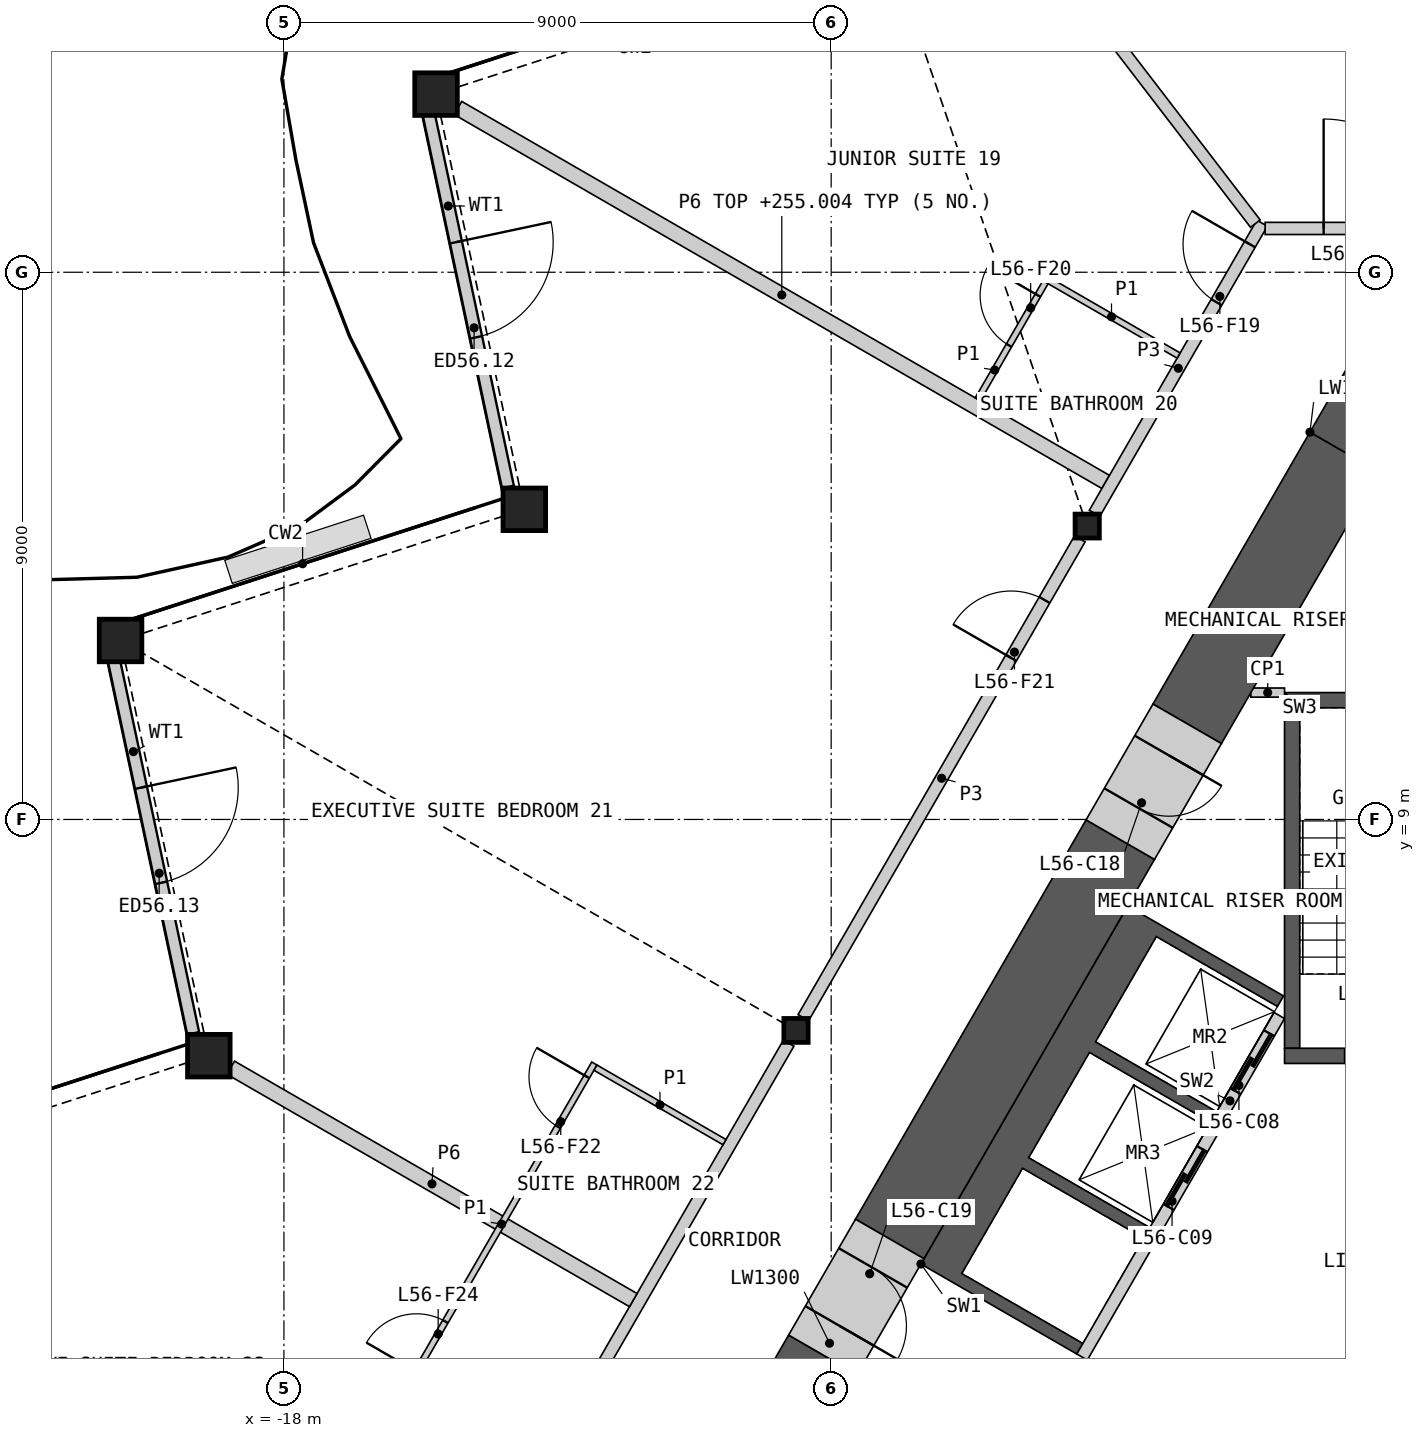
"""IFC4 building model, lengths in metres.
Left out: names, types, materials, properties, quantities, classifications, styles, units other than length and angle.
Written with IfcOpenShell. Run it as: python <this file> out.ifc"""

import sys

from ifc_helpers import new_model, si_unit, direction, frame, frame_2d, origin, origin_2d, place, context, subcontext, project, spatial, polyline, rectangle, hollow_rectangle, i_section, outline, extrude, element, fill, save


model = new_model("IFC4")
c1 = context("Model", 3, precision=1e-05, world=origin(), true_north=direction((0.0, 1.0)))
c2 = subcontext(c1, "Body", "Model", "MODEL_VIEW")
j1 = project(units=[si_unit("LENGTHUNIT", "METRE"), si_unit("PLANEANGLEUNIT", "RADIAN")], contexts=[c1])
p1 = place(None, origin())
s1 = spatial("IfcSite", under=j1, at=p1, CompositionType="ELEMENT")
p2 = place(p1, origin())
s2 = spatial("IfcBuilding", under=s1, at=p2, CompositionType="ELEMENT")
p3 = place(p2, frame((0.0, 0.0, 252.6)))
s3 = spatial("IfcBuildingStorey", under=s2, at=p3, CompositionType="ELEMENT", Elevation=252.6)
for number, where, z_axis, x_axis in (
    (1, (-15.499, 20.93, 0.0), (0.0, 0.0, 1.0), (1.0, 0.0, 0.0)),
    (2, (-14.047, 14.101, 0.0), (0.0, 0.0, 1.0), (1.0, 0.0, 0.0)),
    (3, (-20.687, 11.943, 0.0), (0.0, 0.0, 1.0), (1.0, 0.0, 0.0)),
    (4, (-19.235, 5.115, 0.0), (0.0, 0.0, 1.0), (1.0, 0.0, 0.0)),
):
    element("IfcColumn", number, at=place(p3, frame(where, z_axis=z_axis, x_axis=x_axis)), inside=s3, PredefinedType="COLUMN", context=c2, shape_type="SweptSolid", body=[
        extrude(hollow_rectangle(XDim=0.7, YDim=0.7, WallThickness=0.045, at=origin_2d()), origin(), (0.0, 0.0, 1.0), 3.6),
    ])
for number, where, z_axis, x_axis in (
    (5, (-4.789, 13.825, 0.0), (0.0, 0.0, 1.0), (1.0, 0.0, 0.0)),
    (6, (-9.578, 5.53, 0.0), (0.0, 0.0, 1.0), (1.0, 0.0, 0.0)),
):
    element("IfcColumn", number, at=place(p3, frame(where, z_axis=z_axis, x_axis=x_axis)), inside=s3, PredefinedType="COLUMN", context=c2, shape_type="SweptSolid", body=[
        extrude(i_section(OverallWidth=0.399, OverallDepth=0.393, WebThickness=0.023, FlangeThickness=0.037, at=origin_2d()), origin(), (0.0, 0.0, 1.0), 3.6),
    ])
p4 = place(p3, frame((-15.626, 20.631, 0.0), z_axis=(0.0, 0.0, 1.0), x_axis=(0.207882853761, -0.978153729795, 0.0)))
e7 = element("IfcWall", 7, at=p4, inside=s3, PredefinedType="SOLIDWALL", context=c2, shape_type="SweptSolid", body=[
    extrude(rectangle(XDim=6.301, YDim=0.2, at=frame_2d((3.15, 0.0))), origin(), (0.0, 0.0, 1.0), 2.701),
])
p5 = place(p4, frame((2.184, 0.0, 0.0)))
e8 = element("IfcOpeningElement", 8, at=p5, cuts=e7, PredefinedType="OPENING", context=c2, shape_type="SweptSolid", body=[
    extrude(rectangle(XDim=1.6, YDim=2.4, at=frame_2d((0.8, 1.2))), frame((0.0, 0.11, 0.0), z_axis=(0.0, -1.0, 0.0), x_axis=(1.0, 0.0, 0.0)), (0.0, 0.0, 1.0), 0.22),
])
p6 = place(p3, frame((-20.805, 11.659, 0.0), z_axis=(0.0, 0.0, 1.0), x_axis=(0.207913305093, -0.978147257608, 0.0)))
e9 = element("IfcWall", 9, at=p6, inside=s3, PredefinedType="SOLIDWALL", context=c2, shape_type="SweptSolid", body=[
    extrude(rectangle(XDim=6.316, YDim=0.2, at=frame_2d((3.158, 0.0))), origin(), (0.0, 0.0, 1.0), 2.701),
])
p7 = place(p6, frame((2.184, 0.0, 0.0)))
e10 = element("IfcOpeningElement", 10, at=p7, cuts=e9, PredefinedType="OPENING", context=c2, shape_type="SweptSolid", body=[
    extrude(rectangle(XDim=1.6, YDim=2.4, at=frame_2d((0.8, 1.2))), frame((0.0, 0.11, 0.0), z_axis=(0.0, -1.0, 0.0), x_axis=(1.0, 0.0, 0.0)), (0.0, 0.0, 1.0), 0.22),
])
p8 = place(p3, origin())
e11 = element("IfcWall", 11, at=p8, inside=s3, PredefinedType="SHEAR", context=c2, shape_type="SweptSolid", body=[
    extrude(outline(polyline([(-7.524, 1.688), (-4.124, 7.577), (-3.731, 7.35), (-1.561, 6.097), (-1.66, 5.924), (-3.652, 7.074), (-4.652, 5.342), (-2.66, 4.192), (-2.76, 4.019), (-4.752, 5.169), (-5.752, 3.437), (-3.76, 2.287), (-3.861, 2.113), (-5.852, 3.263), (-6.852, 1.531), (-4.861, 0.381), (-4.96, 0.208), (-7.131, 1.461), (-7.524, 1.688)])), origin(), (0.0, 0.0, 1.0), 3.25),
])
p9 = place(p3, frame((-1.631, 5.776, 0.0), z_axis=(0.0, 0.0, 1.0), x_axis=(-0.499992876559, -0.866029516466, 0.0)))
e12 = element("IfcWall", 12, at=p9, inside=s3, PredefinedType="SOLIDWALL", context=c2, shape_type="SweptSolid", body=[
    extrude(rectangle(XDim=6.486, YDim=0.2, at=frame_2d((3.243, 0.0))), origin(), (0.0, 0.0, 1.0), 3.25),
])
p10 = place(p9, frame((0.337, 0.0, 0.0)))
e13 = element("IfcOpeningElement", 13, at=p10, cuts=e12, PredefinedType="OPENING", context=c2, shape_type="SweptSolid", body=[
    extrude(rectangle(XDim=1.1, YDim=2.1, at=frame_2d((0.55, 1.05))), frame((0.0, 0.11, 0.0), z_axis=(0.0, -1.0, 0.0), x_axis=(1.0, 0.0, 0.0)), (0.0, 0.0, 1.0), 0.22),
])
p11 = place(p9, frame((2.537, 0.0, 0.0)))
e14 = element("IfcOpeningElement", 14, at=p11, cuts=e12, PredefinedType="OPENING", context=c2, shape_type="SweptSolid", body=[
    extrude(rectangle(XDim=1.1, YDim=2.1, at=frame_2d((0.55, 1.05))), frame((0.0, 0.11, 0.0), z_axis=(0.0, -1.0, 0.0), x_axis=(1.0, 0.0, 0.0)), (0.0, 0.0, 1.0), 0.22),
])
p12 = place(p3, origin())
e15 = element("IfcWall", 15, at=p12, inside=s3, PredefinedType="SHEAR", context=c2, shape_type="SweptSolid", body=[
    extrude(outline(polyline([(1.544, 11.087), (-1.544, 11.087), (-1.294, 10.837), (1.294, 10.837), (1.544, 11.087)])), origin(), (0.0, 0.0, 1.0), 3.25),
])
p13 = place(p3, origin())
e16 = element("IfcWall", 16, at=p13, inside=s3, PredefinedType="SHEAR", context=c2, shape_type="SweptSolid", body=[
    extrude(outline(polyline([(-1.294, 10.837), (-1.544, 11.087), (-1.544, 5.237), (-1.294, 5.237), (-1.294, 10.837)])), origin(), (0.0, 0.0, 1.0), 3.25),
])
p14 = place(p3, frame((1.544, 5.112, 0.0), z_axis=(0.0, 0.0, 1.0), x_axis=(-1.0, 0.0, 0.0)))
e17 = element("IfcWall", 17, at=p14, inside=s3, PredefinedType="SHEAR", context=c2, shape_type="SweptSolid", body=[
    extrude(rectangle(XDim=3.088, YDim=0.25, at=frame_2d((1.544, 0.0))), origin(), (0.0, 0.0, 1.0), 3.25),
])
p15 = place(p14, frame((0.994, 0.0, 0.0)))
e18 = element("IfcOpeningElement", 18, at=p15, cuts=e17, PredefinedType="OPENING", context=c2, shape_type="SweptSolid", body=[
    extrude(rectangle(XDim=1.1, YDim=2.1, at=frame_2d((0.55, 1.05))), frame((0.0, 0.135, 0.0), z_axis=(0.0, -1.0, 0.0), x_axis=(1.0, 0.0, 0.0)), (0.0, 0.0, 1.0), 0.27),
])
p16 = place(p3, frame((-1.544, 11.087, 0.0), z_axis=(0.0, 0.0, 1.0), x_axis=(-1.0, 0.0, 0.0)))
e19 = element("IfcWall", 19, at=p16, inside=s3, PredefinedType="PARTITIONING", context=c2, shape_type="SweptSolid", body=[
    extrude(rectangle(XDim=0.554, YDim=0.15, at=frame_2d((0.277, 0.0))), origin(), (0.0, 0.0, 1.0), 3.25),
])
p17 = place(p3, frame((-4.245, 8.668, 0.0), z_axis=(0.0, 0.0, 1.0), x_axis=(-0.500002971097, -0.866023688414, 0.0)))
e20 = element("IfcWall", 20, at=p17, inside=s3, PredefinedType="SHEAR", context=c2, shape_type="SweptSolid", body=[
    extrude(rectangle(XDim=7.584, YDim=1.3, at=frame_2d((3.792, 0.0))), origin(), (0.0, 0.0, 1.0), 3.25),
])
p18 = place(p3, frame((-0.563, 15.045, 0.0), z_axis=(0.0, 0.0, 1.0), x_axis=(-0.499982995661, -0.866035221021, 0.0)))
e21 = element("IfcWall", 21, at=p18, inside=s3, PredefinedType="SHEAR", context=c2, shape_type="SweptSolid", body=[
    extrude(rectangle(XDim=5.164, YDim=1.3, at=frame_2d((2.582, 0.0))), origin(), (0.0, 0.0, 1.0), 3.25),
])
p19 = place(p3, frame((-9.137, 0.195, 0.0), z_axis=(0.0, 0.0, 1.0), x_axis=(-0.499985697398, -0.866033661238, 0.0)))
e22 = element("IfcWall", 22, at=p19, inside=s3, PredefinedType="SHEAR", context=c2, shape_type="SweptSolid", body=[
    extrude(rectangle(XDim=4.362, YDim=1.3, at=frame_2d((2.181, 0.0))), origin(), (0.0, 0.0, 1.0), 3.25),
])
p20 = place(p3, origin())
e23 = element("IfcWall", 23, at=p20, inside=s3, PredefinedType="SHEAR", context=c2, shape_type="SweptSolid", body=[
    extrude(outline(polyline([(-1.126, 15.371), (0.0, 17.321), (1.126, 15.371), (0.0, 14.72), (-1.126, 15.371)])), origin(), (0.0, 0.0, 1.0), 3.25),
])
p21 = place(p3, frame((-3.145, 10.573, 0.0), z_axis=(0.0, 0.0, 1.0), x_axis=(-0.50002983664, -0.866008176907, 0.0)))
e24 = element("IfcWall", 24, at=p21, inside=s3, PredefinedType="SHEAR", context=c2, shape_type="SweptSolid", body=[
    extrude(rectangle(XDim=2.2, YDim=1.3, at=frame_2d((1.1, 0.0))), origin(), (0.0, 0.0, 1.0), 3.25),
])
p22 = place(p21, frame((0.6, 0.0, 0.0)))
e25 = element("IfcOpeningElement", 25, at=p22, cuts=e24, PredefinedType="OPENING", context=c2, shape_type="SweptSolid", body=[
    extrude(rectangle(XDim=1.0, YDim=2.1, at=frame_2d((0.5, 1.05))), frame((0.0, 0.66, 0.0), z_axis=(0.0, -1.0, 0.0), x_axis=(1.0, 0.0, 0.0)), (0.0, 0.0, 1.0), 1.32),
])
p23 = place(p3, frame((-8.037, 2.1, 0.0), z_axis=(0.0, 0.0, 1.0), x_axis=(-0.50002983664, -0.866008176907, 0.0)))
e26 = element("IfcWall", 26, at=p23, inside=s3, PredefinedType="SHEAR", context=c2, shape_type="SweptSolid", body=[
    extrude(rectangle(XDim=2.2, YDim=1.3, at=frame_2d((1.1, 0.0))), origin(), (0.0, 0.0, 1.0), 3.25),
])
p24 = place(p23, frame((0.55, 0.0, 0.0)))
e27 = element("IfcOpeningElement", 27, at=p24, cuts=e26, PredefinedType="OPENING", context=c2, shape_type="SweptSolid", body=[
    extrude(rectangle(XDim=1.1, YDim=2.1, at=frame_2d((0.55, 1.05))), frame((0.0, 0.66, 0.0), z_axis=(0.0, -1.0, 0.0), x_axis=(1.0, 0.0, 0.0)), (0.0, 0.0, 1.0), 1.32),
])
p25 = place(p3, frame((-15.138, 20.702, 0.0), z_axis=(0.0, 0.0, 1.0), x_axis=(0.86602627735, -0.499998486937, 0.0)))
e28 = element("IfcWall", 28, at=p25, inside=s3, PredefinedType="PARTITIONING", context=c2, shape_type="SweptSolid", body=[
    extrude(rectangle(XDim=12.301, YDim=0.25, at=frame_2d((6.15, 0.0))), origin(), (0.0, 0.0, 1.0), 2.404),
])
p26 = place(p3, frame((-14.247, -2.556, 0.0), z_axis=(0.0, 0.0, 1.0), x_axis=(0.49998193945, 0.866035830797, 0.0)))
e29 = element("IfcWall", 29, at=p26, inside=s3, PredefinedType="PARTITIONING", context=c2, shape_type="SweptSolid", body=[
    extrude(rectangle(XDim=9.094, YDim=0.2, at=frame_2d((4.547, 0.0))), origin(), (0.0, 0.0, 1.0), 3.25),
])
p27 = place(p3, frame((-9.458, 5.74, 0.0), z_axis=(0.0, 0.0, 1.0), x_axis=(0.50000207303, 0.866024206917, 0.0)))
e30 = element("IfcWall", 30, at=p27, inside=s3, PredefinedType="PARTITIONING", context=c2, shape_type="SweptSolid", body=[
    extrude(rectangle(XDim=9.095, YDim=0.2, at=frame_2d((4.547, 0.0))), origin(), (0.0, 0.0, 1.0), 3.25),
])
p28 = place(p27, frame((6.833, 0.0, 0.0)))
e31 = element("IfcOpeningElement", 31, at=p28, cuts=e30, PredefinedType="OPENING", context=c2, shape_type="SweptSolid", body=[
    extrude(rectangle(XDim=1.1, YDim=2.1, at=frame_2d((0.55, 1.05))), frame((0.0, 0.11, 0.0), z_axis=(0.0, -1.0, 0.0), x_axis=(1.0, 0.0, 0.0)), (0.0, 0.0, 1.0), 0.22),
])
p29 = place(p3, frame((-18.875, 4.917, 0.0), z_axis=(0.0, 0.0, 1.0), x_axis=(0.866017519557, -0.500013655634, 0.0)))
e32 = element("IfcWall", 32, at=p29, inside=s3, PredefinedType="PARTITIONING", context=c2, shape_type="SweptSolid", body=[
    extrude(rectangle(XDim=7.644, YDim=0.25, at=frame_2d((3.822, 0.0))), origin(), (0.0, 0.0, 1.0), 2.404),
])
p30 = place(p3, frame((-4.668, 14.035, 0.0), z_axis=(0.0, 0.0, 1.0), x_axis=(0.499984524817, 0.866034338201, 0.0)))
e33 = element("IfcWall", 33, at=p30, inside=s3, PredefinedType="PARTITIONING", context=c2, shape_type="SweptSolid", body=[
    extrude(rectangle(XDim=5.51, YDim=0.2, at=frame_2d((2.755, 0.0))), origin(), (0.0, 0.0, 1.0), 3.25),
])
p31 = place(p30, frame((4.01, 0.0, 0.0)))
e34 = element("IfcOpeningElement", 34, at=p31, cuts=e33, PredefinedType="OPENING", context=c2, shape_type="SweptSolid", body=[
    extrude(rectangle(XDim=1.1, YDim=2.1, at=frame_2d((0.55, 1.05))), frame((0.0, 0.11, 0.0), z_axis=(0.0, -1.0, 0.0), x_axis=(1.0, 0.0, 0.0)), (0.0, 0.0, 1.0), 0.22),
])
p32 = place(p3, frame((-1.863, 18.72, 0.0), z_axis=(0.0, 0.0, 1.0), x_axis=(1.0, 0.0, 0.0)))
e35 = element("IfcWall", 35, at=p32, inside=s3, PredefinedType="PARTITIONING", context=c2, shape_type="SweptSolid", body=[
    extrude(rectangle(XDim=3.826, YDim=0.2, at=frame_2d((1.913, 0.0))), origin(), (0.0, 0.0, 1.0), 3.25),
])
p33 = place(p32, frame((0.962, 0.0, 0.0)))
e36 = element("IfcOpeningElement", 36, at=p33, cuts=e35, PredefinedType="OPENING", context=c2, shape_type="SweptSolid", body=[
    extrude(rectangle(XDim=1.8, YDim=2.1, at=frame_2d((0.9, 1.05))), frame((0.0, 0.11, 0.0), z_axis=(0.0, -1.0, 0.0), x_axis=(1.0, 0.0, 0.0)), (0.0, 0.0, 1.0), 0.22),
])
p34 = place(p3, frame((-10.277, 29.556, 0.0), z_axis=(0.0, 0.0, 1.0), x_axis=(0.60876001101, -0.793354428358, 0.0)))
e37 = element("IfcWall", 37, at=p34, inside=s3, PredefinedType="PARTITIONING", context=c2, shape_type="SweptSolid", body=[
    extrude(rectangle(XDim=13.558, YDim=0.2, at=frame_2d((6.779, 0.0))), origin(), (0.0, 0.0, 1.0), 2.404),
])
p35 = place(p3, frame((-15.945, -0.297, 0.0), z_axis=(0.0, 0.0, 1.0), x_axis=(0.499978833458, 0.866037623948, 0.0)))
e38 = element("IfcWall", 38, at=p35, inside=s3, PredefinedType="PARTITIONING", context=c2, shape_type="SweptSolid", body=[
    extrude(rectangle(XDim=6.1, YDim=0.1, at=frame_2d((3.05, 0.0))), origin(), (0.0, 0.0, 1.0), 2.404),
])
p36 = place(p35, frame((4.9, 0.0, 0.0)))
e39 = element("IfcOpeningElement", 39, at=p36, cuts=e38, PredefinedType="OPENING", context=c2, shape_type="SweptSolid", body=[
    extrude(rectangle(XDim=0.95, YDim=2.1, at=frame_2d((0.475, 1.05))), frame((0.0, 0.06, 0.0), z_axis=(0.0, -1.0, 0.0), x_axis=(1.0, 0.0, 0.0)), (0.0, 0.0, 1.0), 0.12),
])
p37 = place(p35, frame((0.25, 0.0, 0.0)))
e40 = element("IfcOpeningElement", 40, at=p37, cuts=e38, PredefinedType="OPENING", context=c2, shape_type="SweptSolid", body=[
    extrude(rectangle(XDim=0.95, YDim=2.1, at=frame_2d((0.475, 1.05))), frame((0.0, 0.06, 0.0), z_axis=(0.0, -1.0, 0.0), x_axis=(1.0, 0.0, 0.0)), (0.0, 0.0, 1.0), 0.12),
])
p38 = place(p3, frame((-12.877, 4.917, 0.0), z_axis=(0.0, 0.0, 1.0), x_axis=(0.866057815567, -0.499943856944, 0.0)))
e41 = element("IfcWall", 41, at=p38, inside=s3, PredefinedType="PARTITIONING", context=c2, shape_type="SweptSolid", body=[
    extrude(rectangle(XDim=2.45, YDim=0.1, at=frame_2d((1.225, 0.0))), origin(), (0.0, 0.0, 1.0), 2.404),
])
p39 = place(p3, frame((-5.494, 17.905, 0.0), z_axis=(0.0, 0.0, 1.0), x_axis=(0.866030925526, -0.499990435942, 0.0)))
e42 = element("IfcWall", 42, at=p39, inside=s3, PredefinedType="PARTITIONING", context=c2, shape_type="SweptSolid", body=[
    extrude(rectangle(XDim=2.55, YDim=0.1, at=frame_2d((1.275, 0.0))), origin(), (0.0, 0.0, 1.0), 2.404),
])
p40 = place(p3, frame((-6.588, 15.909, 0.0), z_axis=(0.0, 0.0, 1.0), x_axis=(0.49999788721, 0.866026623601, 0.0)))
e43 = element("IfcWall", 43, at=p40, inside=s3, PredefinedType="PARTITIONING", context=c2, shape_type="SweptSolid", body=[
    extrude(rectangle(XDim=2.225, YDim=0.1, at=frame_2d((1.113, 0.0))), origin(), (0.0, 0.0, 1.0), 2.404),
])
p41 = place(p40, frame((1.025, 0.0, 0.0)))
e44 = element("IfcOpeningElement", 44, at=p41, cuts=e43, PredefinedType="OPENING", context=c2, shape_type="SweptSolid", body=[
    extrude(rectangle(XDim=0.95, YDim=2.1, at=frame_2d((0.475, 1.05))), frame((0.0, 0.06, 0.0), z_axis=(0.0, -1.0, 0.0), x_axis=(1.0, 0.0, 0.0)), (0.0, 0.0, 1.0), 0.12),
])
p42 = place(p5, origin())
e45 = element("IfcDoor", 45, at=p42, inside=s3, OperationType="DOUBLE_DOOR_SINGLE_SWING", PredefinedType="DOOR", context=c2, shape_type="SweptSolid", body=[
    extrude(rectangle(XDim=1.6, YDim=2.4, at=frame_2d((0.8, 1.2))), frame((0.0, 0.025, 0.0), z_axis=(0.0, -1.0, 0.0), x_axis=(1.0, 0.0, 0.0)), (0.0, 0.0, 1.0), 0.05),
])
fill(e8, e45)
p43 = place(p7, origin())
e46 = element("IfcDoor", 46, at=p43, inside=s3, OperationType="DOUBLE_DOOR_SINGLE_SWING", PredefinedType="DOOR", context=c2, shape_type="SweptSolid", body=[
    extrude(rectangle(XDim=1.6, YDim=2.4, at=frame_2d((0.8, 1.2))), frame((0.0, 0.025, 0.0), z_axis=(0.0, -1.0, 0.0), x_axis=(1.0, 0.0, 0.0)), (0.0, 0.0, 1.0), 0.05),
])
fill(e10, e46)
p44 = place(p10, origin())
e47 = element("IfcDoor", 47, at=p44, inside=s3, OperationType="SLIDING_TO_LEFT", PredefinedType="DOOR", context=c2, shape_type="SweptSolid", body=[
    extrude(rectangle(XDim=1.1, YDim=2.1, at=frame_2d((0.55, 1.05))), frame((0.0, 0.025, 0.0), z_axis=(0.0, -1.0, 0.0), x_axis=(1.0, 0.0, 0.0)), (0.0, 0.0, 1.0), 0.05),
])
fill(e13, e47)
p45 = place(p11, origin())
e48 = element("IfcDoor", 48, at=p45, inside=s3, OperationType="SLIDING_TO_LEFT", PredefinedType="DOOR", context=c2, shape_type="SweptSolid", body=[
    extrude(rectangle(XDim=1.1, YDim=2.1, at=frame_2d((0.55, 1.05))), frame((0.0, 0.025, 0.0), z_axis=(0.0, -1.0, 0.0), x_axis=(1.0, 0.0, 0.0)), (0.0, 0.0, 1.0), 0.05),
])
fill(e14, e48)
p46 = place(p15, origin())
e49 = element("IfcDoor", 49, at=p46, inside=s3, OperationType="SINGLE_SWING_LEFT", PredefinedType="DOOR", context=c2, shape_type="SweptSolid", body=[
    extrude(rectangle(XDim=1.1, YDim=2.1, at=frame_2d((0.55, 1.05))), frame((0.0, 0.025, 0.0), z_axis=(0.0, -1.0, 0.0), x_axis=(1.0, 0.0, 0.0)), (0.0, 0.0, 1.0), 0.05),
])
fill(e18, e49)
p47 = place(p22, origin())
e50 = element("IfcDoor", 50, at=p47, inside=s3, OperationType="SINGLE_SWING_LEFT", PredefinedType="DOOR", context=c2, shape_type="SweptSolid", body=[
    extrude(rectangle(XDim=1.0, YDim=2.1, at=frame_2d((0.5, 1.05))), frame((0.0, 0.405, 0.0), z_axis=(0.0, -1.0, 0.0), x_axis=(1.0, 0.0, 0.0)), (0.0, 0.0, 1.0), 0.05),
])
fill(e25, e50)
p48 = place(p24, origin())
e51 = element("IfcDoor", 51, at=p48, inside=s3, OperationType="SINGLE_SWING_RIGHT", PredefinedType="DOOR", context=c2, shape_type="SweptSolid", body=[
    extrude(rectangle(XDim=1.1, YDim=2.1, at=frame_2d((0.55, 1.05))), frame((0.0, 0.405, 0.0), z_axis=(0.0, -1.0, 0.0), x_axis=(1.0, 0.0, 0.0)), (0.0, 0.0, 1.0), 0.05),
])
fill(e27, e51)
p49 = place(p33, origin())
e52 = element("IfcDoor", 52, at=p49, inside=s3, OperationType="DOUBLE_DOOR_SINGLE_SWING", PredefinedType="DOOR", context=c2, shape_type="SweptSolid", body=[
    extrude(rectangle(XDim=1.8, YDim=2.1, at=frame_2d((0.9, 1.05))), frame((0.0, 0.025, 0.0), z_axis=(0.0, -1.0, 0.0), x_axis=(1.0, 0.0, 0.0)), (0.0, 0.0, 1.0), 0.05),
])
fill(e36, e52)
p50 = place(p31, origin())
e53 = element("IfcDoor", 53, at=p50, inside=s3, OperationType="SINGLE_SWING_RIGHT", PredefinedType="DOOR", context=c2, shape_type="SweptSolid", body=[
    extrude(rectangle(XDim=1.1, YDim=2.1, at=frame_2d((0.55, 1.05))), frame((0.0, 0.025, 0.0), z_axis=(0.0, -1.0, 0.0), x_axis=(1.0, 0.0, 0.0)), (0.0, 0.0, 1.0), 0.05),
])
fill(e34, e53)
p51 = place(p41, origin())
e54 = element("IfcDoor", 54, at=p51, inside=s3, OperationType="SINGLE_SWING_RIGHT", PredefinedType="DOOR", context=c2, shape_type="SweptSolid", body=[
    extrude(rectangle(XDim=0.95, YDim=2.1, at=frame_2d((0.475, 1.05))), frame((0.0, 0.025, 0.0), z_axis=(0.0, -1.0, 0.0), x_axis=(1.0, 0.0, 0.0)), (0.0, 0.0, 1.0), 0.05),
])
fill(e44, e54)
p52 = place(p28, origin())
e55 = element("IfcDoor", 55, at=p52, inside=s3, OperationType="SINGLE_SWING_LEFT", PredefinedType="DOOR", context=c2, shape_type="SweptSolid", body=[
    extrude(rectangle(XDim=1.1, YDim=2.1, at=frame_2d((0.55, 1.05))), frame((0.0, 0.025, 0.0), z_axis=(0.0, -1.0, 0.0), x_axis=(1.0, 0.0, 0.0)), (0.0, 0.0, 1.0), 0.05),
])
fill(e31, e55)
p53 = place(p36, origin())
e56 = element("IfcDoor", 56, at=p53, inside=s3, OperationType="SINGLE_SWING_RIGHT", PredefinedType="DOOR", context=c2, shape_type="SweptSolid", body=[
    extrude(rectangle(XDim=0.95, YDim=2.1, at=frame_2d((0.475, 1.05))), frame((0.0, 0.025, 0.0), z_axis=(0.0, -1.0, 0.0), x_axis=(1.0, 0.0, 0.0)), (0.0, 0.0, 1.0), 0.05),
])
fill(e39, e56)
p54 = place(p37, origin())
e57 = element("IfcDoor", 57, at=p54, inside=s3, OperationType="SINGLE_SWING_LEFT", PredefinedType="DOOR", context=c2, shape_type="SweptSolid", body=[
    extrude(rectangle(XDim=0.95, YDim=2.1, at=frame_2d((0.475, 1.05))), frame((0.0, 0.025, 0.0), z_axis=(0.0, -1.0, 0.0), x_axis=(1.0, 0.0, 0.0)), (0.0, 0.0, 1.0), 0.05),
])
fill(e40, e57)
save(model, sys.argv[1])
